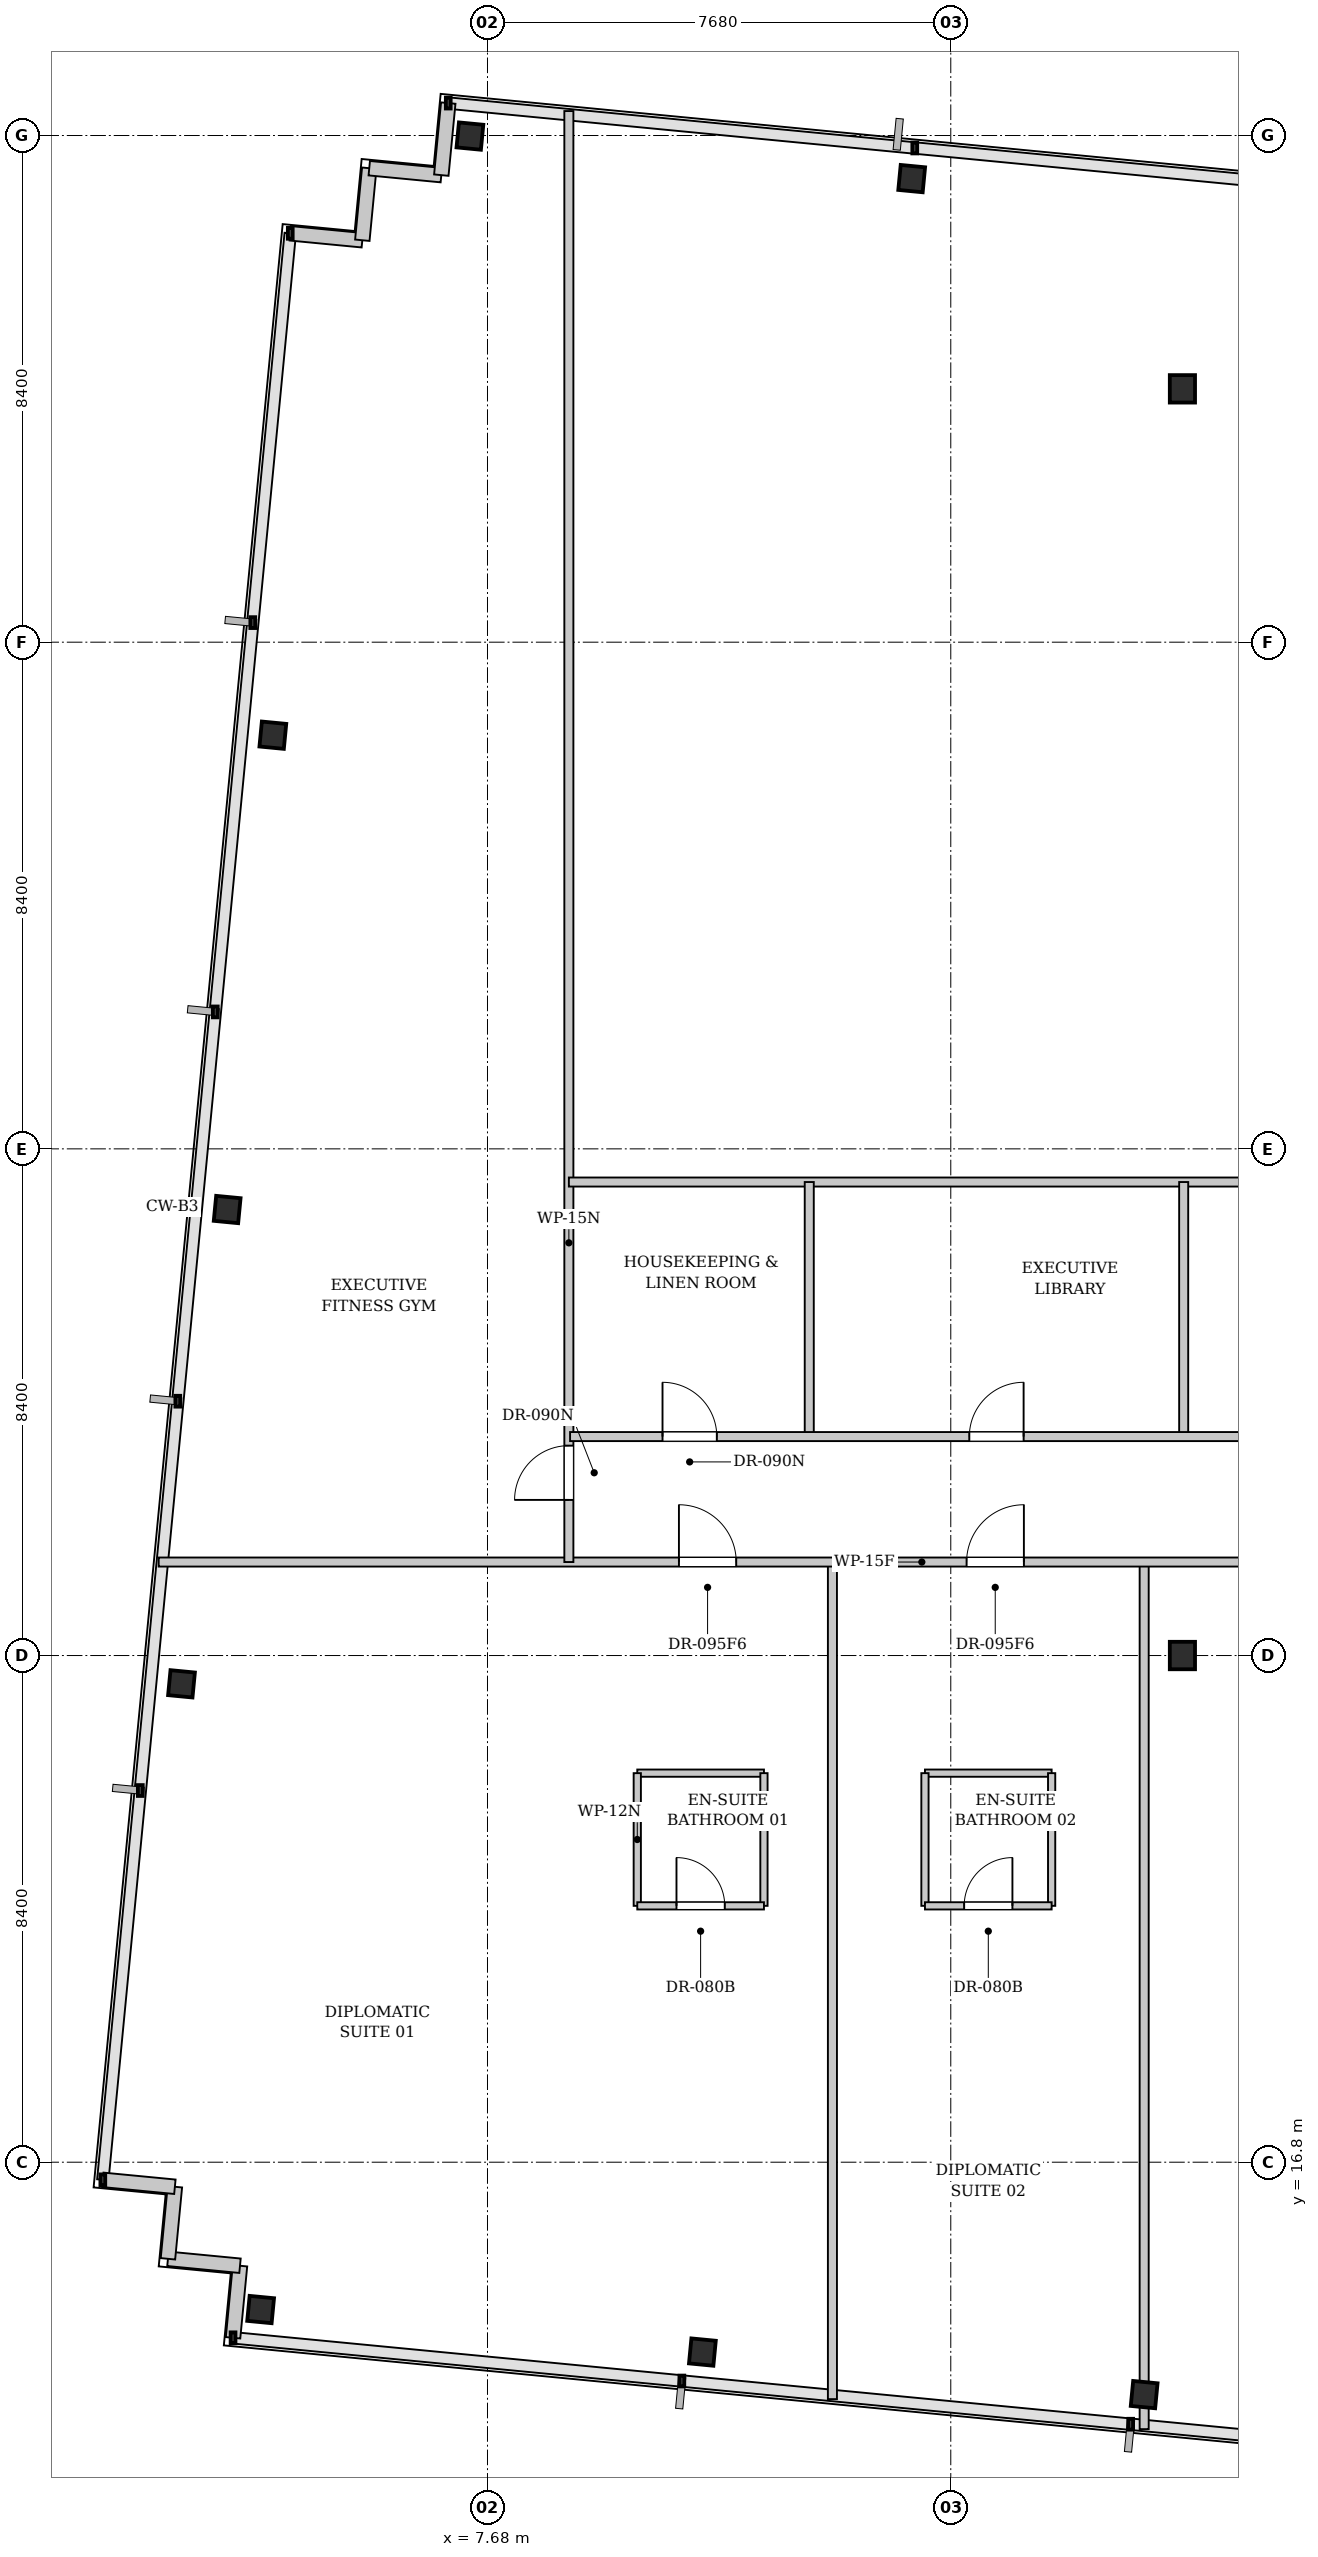
"""IFC4 building model, lengths in metres.
Left out: names, types, materials, properties, quantities, classifications, styles, units other than length and angle.
Written with IfcOpenShell. Run it as: python <this file> out.ifc"""

import sys

from ifc_helpers import new_model, si_unit, direction, frame, frame_2d, origin, origin_2d, place, context, subcontext, project, spatial, rectangle, i_section, extrude, element, fill, save


model = new_model("IFC4")
c1 = context("Model", 3, precision=1e-05, world=origin(), true_north=direction((0.0, 1.0)))
c2 = subcontext(c1, "Body", "Model", "MODEL_VIEW")
j1 = project(units=[si_unit("LENGTHUNIT", "METRE"), si_unit("PLANEANGLEUNIT", "RADIAN")], contexts=[c1])
p1 = place(None, origin())
s1 = spatial("IfcSite", under=j1, at=p1, CompositionType="ELEMENT")
p2 = place(p1, origin())
s2 = spatial("IfcBuilding", under=s1, at=p2, CompositionType="ELEMENT")
p3 = place(p2, frame((0.0, 0.0, 172.1)))
s3 = spatial("IfcBuildingStorey", under=s2, at=p3, CompositionType="ELEMENT", Elevation=172.1)
for number, where, z_axis, x_axis in (
    (1, (19.2, 25.2, 0.0), (0.0, 0.0, 1.0), (1.0, 0.0, 0.0)),
    (2, (19.2, 46.2, 0.0), (0.0, 0.0, 1.0), (1.0, 0.0, 0.0)),
):
    element("IfcColumn", number, at=place(p3, frame(where, z_axis=z_axis, x_axis=x_axis)), inside=s3, PredefinedType="COLUMN", context=c2, shape_type="SweptSolid", body=[
        extrude(i_section(OverallWidth=0.418, OverallDepth=0.455, WebThickness=0.042, FlangeThickness=0.068, FilletRadius=0.015, at=origin_2d()), origin(), (0.0, 0.0, 1.0), 3.3),
    ])
for number, where, z_axis, x_axis in (
    (3, (3.919, 14.357, 0.0), (0.0, 0.0, 1.0), (0.995, -0.096, 0.0)),
    (4, (11.242, 13.652, 0.0), (0.0, 0.0, 1.0), (0.995, -0.096, 0.0)),
    (5, (18.566, 12.947, 0.0), (0.0, 0.0, 1.0), (0.995, -0.096, 0.0)),
    (6, (7.389, 50.391, 0.0), (0.0, 0.0, 1.0), (0.995, -0.096, 0.0)),
    (7, (14.712, 49.686, 0.0), (0.0, 0.0, 1.0), (0.995, -0.096, 0.0)),
    (8, (2.607, 24.731, 0.0), (0.0, 0.0, 1.0), (0.995, -0.096, 0.0)),
    (9, (3.365, 32.594, 0.0), (0.0, 0.0, 1.0), (0.995, -0.096, 0.0)),
    (10, (4.122, 40.458, 0.0), (0.0, 0.0, 1.0), (0.995, -0.096, 0.0)),
):
    element("IfcColumn", number, at=place(p3, frame(where, z_axis=z_axis, x_axis=x_axis)), inside=s3, PredefinedType="COLUMN", context=c2, shape_type="SweptSolid", body=[
        extrude(i_section(OverallWidth=0.406, OverallDepth=0.416, WebThickness=0.03, FlangeThickness=0.048, FilletRadius=0.015, at=origin_2d()), origin(), (0.0, 0.0, 1.0), 3.3),
    ])
for number, where, z_axis, x_axis in (
    (11, (3.462, 13.889, 0.0), (0.0, 0.0, 1.0), (0.096, 0.995, 0.0)),
    (12, (3.577, 15.083, 0.0), (0.0, 0.0, 1.0), (-0.995, 0.096, 0.0)),
):
    element("IfcWall", number, at=place(p3, frame(where, z_axis=z_axis, x_axis=x_axis)), inside=s3, PredefinedType="SOLIDWALL", context=c2, shape_type="SweptSolid", body=[
        extrude(rectangle(XDim=1.2, YDim=0.24, at=frame_2d((0.6, 0.0))), origin(), (0.0, 0.0, 1.0), 3.08),
    ])
p4 = place(p3, frame((2.383, 15.198, 0.0), z_axis=(0.0, 0.0, 1.0), x_axis=(0.095836473879, 0.995397091755, 0.0)))
e13 = element("IfcWall", 13, at=p4, inside=s3, PredefinedType="SOLIDWALL", context=c2, shape_type="SweptSolid", body=[
    extrude(rectangle(XDim=1.2, YDim=0.24, at=frame_2d((0.6, 0.0))), origin(), (0.0, 0.0, 1.0), 3.08),
])
p5 = place(p3, frame((2.498, 16.393, 0.0), z_axis=(0.0, 0.0, 1.0), x_axis=(-0.995398960025, 0.095817067274, 0.0)))
e14 = element("IfcWall", 14, at=p5, inside=s3, PredefinedType="SOLIDWALL", context=c2, shape_type="SweptSolid", body=[
    extrude(rectangle(XDim=1.2, YDim=0.24, at=frame_2d((0.6, 0.0))), origin(), (0.0, 0.0, 1.0), 3.08),
])
p6 = place(p3, frame((4.411, 48.779, 0.0), z_axis=(0.0, 0.0, 1.0), x_axis=(0.995397091755, -0.095836473879, 0.0)))
e15 = element("IfcWall", 15, at=p6, inside=s3, PredefinedType="SOLIDWALL", context=c2, shape_type="SweptSolid", body=[
    extrude(rectangle(XDim=1.2, YDim=0.24, at=frame_2d((0.6, 0.0))), origin(), (0.0, 0.0, 1.0), 3.08),
])
p7 = place(p3, frame((5.605, 48.664, 0.0), z_axis=(0.0, 0.0, 1.0), x_axis=(0.096018626938, 0.995379537303, 0.0)))
e16 = element("IfcWall", 16, at=p7, inside=s3, PredefinedType="SOLIDWALL", context=c2, shape_type="SweptSolid", body=[
    extrude(rectangle(XDim=1.2, YDim=0.24, at=frame_2d((0.6, 0.0))), origin(), (0.0, 0.0, 1.0), 3.08),
])
for number, where, z_axis, x_axis in (
    (17, (5.72, 49.858, 0.0), (0.0, 0.0, 1.0), (0.995, -0.096, 0.0)),
    (18, (6.915, 49.743, 0.0), (0.0, 0.0, 1.0), (0.096, 0.995, 0.0)),
):
    element("IfcWall", number, at=place(p3, frame(where, z_axis=z_axis, x_axis=x_axis)), inside=s3, PredefinedType="SOLIDWALL", context=c2, shape_type="SweptSolid", body=[
        extrude(rectangle(XDim=1.2, YDim=0.24, at=frame_2d((0.6, 0.0))), origin(), (0.0, 0.0, 1.0), 3.08),
    ])
p8 = place(p3, frame((10.163, 23.25, 0.0), z_axis=(0.0, 0.0, 1.0), x_axis=(1.0, 0.0, 0.0)))
e19 = element("IfcWall", 19, at=p8, inside=s3, PredefinedType="PARTITIONING", context=c2, shape_type="SweptSolid", body=[
    extrude(rectangle(XDim=2.1, YDim=0.12, at=frame_2d((1.05, 0.0))), origin(), (0.0, 0.0, 1.0), 3.08),
])
for number, where, z_axis, x_axis in (
    (20, (10.163, 21.05, 0.0), (0.0, 0.0, 1.0), (0.0, 1.0, 0.0)),
    (21, (12.263, 21.05, 0.0), (0.0, 0.0, 1.0), (0.0, 1.0, 0.0)),
):
    element("IfcWall", number, at=place(p3, frame(where, z_axis=z_axis, x_axis=x_axis)), inside=s3, PredefinedType="PARTITIONING", context=c2, shape_type="SweptSolid", body=[
        extrude(rectangle(XDim=2.2, YDim=0.12, at=frame_2d((1.1, 0.0))), origin(), (0.0, 0.0, 1.0), 3.08),
    ])
p9 = place(p3, frame((10.163, 21.05, 0.0), z_axis=(0.0, 0.0, 1.0), x_axis=(1.0, 0.0, 0.0)))
e22 = element("IfcWall", 22, at=p9, inside=s3, PredefinedType="PARTITIONING", context=c2, shape_type="SweptSolid", body=[
    extrude(rectangle(XDim=2.1, YDim=0.12, at=frame_2d((1.05, 0.0))), origin(), (0.0, 0.0, 1.0), 3.08),
])
p10 = place(p9, frame((0.65, 0.0, 0.0)))
e23 = element("IfcOpeningElement", 23, at=p10, cuts=e22, PredefinedType="OPENING", context=c2, shape_type="SweptSolid", body=[
    extrude(rectangle(XDim=0.8, YDim=2.1, at=frame_2d((0.4, 1.05))), frame((0.0, 0.07, 0.0), z_axis=(0.0, -1.0, 0.0), x_axis=(1.0, 0.0, 0.0)), (0.0, 0.0, 1.0), 0.14),
])
p11 = place(p3, frame((14.932, 23.25, 0.0), z_axis=(0.0, 0.0, 1.0), x_axis=(1.0, 0.0, 0.0)))
e24 = element("IfcWall", 24, at=p11, inside=s3, PredefinedType="PARTITIONING", context=c2, shape_type="SweptSolid", body=[
    extrude(rectangle(XDim=2.1, YDim=0.12, at=frame_2d((1.05, 0.0))), origin(), (0.0, 0.0, 1.0), 3.08),
])
for number, where, z_axis, x_axis in (
    (25, (14.932, 21.05, 0.0), (0.0, 0.0, 1.0), (0.0, 1.0, 0.0)),
    (26, (17.032, 21.05, 0.0), (0.0, 0.0, 1.0), (0.0, 1.0, 0.0)),
):
    element("IfcWall", number, at=place(p3, frame(where, z_axis=z_axis, x_axis=x_axis)), inside=s3, PredefinedType="PARTITIONING", context=c2, shape_type="SweptSolid", body=[
        extrude(rectangle(XDim=2.2, YDim=0.12, at=frame_2d((1.1, 0.0))), origin(), (0.0, 0.0, 1.0), 3.08),
    ])
p12 = place(p3, frame((14.932, 21.05, 0.0), z_axis=(0.0, 0.0, 1.0), x_axis=(1.0, 0.0, 0.0)))
e27 = element("IfcWall", 27, at=p12, inside=s3, PredefinedType="PARTITIONING", context=c2, shape_type="SweptSolid", body=[
    extrude(rectangle(XDim=2.1, YDim=0.12, at=frame_2d((1.05, 0.0))), origin(), (0.0, 0.0, 1.0), 3.08),
])
p13 = place(p12, frame((0.65, 0.0, 0.0)))
e28 = element("IfcOpeningElement", 28, at=p13, cuts=e27, PredefinedType="OPENING", context=c2, shape_type="SweptSolid", body=[
    extrude(rectangle(XDim=0.8, YDim=2.1, at=frame_2d((0.4, 1.05))), frame((0.0, 0.07, 0.0), z_axis=(0.0, -1.0, 0.0), x_axis=(1.0, 0.0, 0.0)), (0.0, 0.0, 1.0), 0.14),
])
p14 = place(p3, frame((13.398, 12.872, 0.0), z_axis=(0.0, 0.0, 1.0), x_axis=(0.0, 1.0, 0.0)))
e29 = element("IfcWall", 29, at=p14, inside=s3, PredefinedType="PARTITIONING", context=c2, shape_type="SweptSolid", body=[
    extrude(rectangle(XDim=13.898, YDim=0.15, at=frame_2d((6.949, 0.0))), origin(), (0.0, 0.0, 1.0), 3.08),
])
p15 = place(p3, frame((18.566, 12.374, 0.0), z_axis=(0.0, 0.0, 1.0), x_axis=(0.0, 1.0, 0.0)))
e30 = element("IfcWall", 30, at=p15, inside=s3, PredefinedType="PARTITIONING", context=c2, shape_type="SweptSolid", body=[
    extrude(rectangle(XDim=14.396, YDim=0.15, at=frame_2d((7.198, 0.0))), origin(), (0.0, 0.0, 1.0), 2.475),
])
p16 = place(p3, frame((2.229, 26.75, 0.0), z_axis=(0.0, 0.0, 1.0), x_axis=(1.0, 0.0, 0.0)))
e31 = element("IfcWall", 31, at=p16, inside=s3, PredefinedType="PARTITIONING", context=c2, shape_type="SweptSolid", body=[
    extrude(rectangle(XDim=57.505, YDim=0.15, at=frame_2d((28.752, 0.0))), origin(), (0.0, 0.0, 1.0), 2.475),
])
p17 = place(p16, frame((8.624, 0.0, 0.0)))
e32 = element("IfcOpeningElement", 32, at=p17, cuts=e31, PredefinedType="OPENING", context=c2, shape_type="SweptSolid", body=[
    extrude(rectangle(XDim=0.95, YDim=2.15, at=frame_2d((0.475, 1.075))), frame((0.0, 0.085, 0.0), z_axis=(0.0, -1.0, 0.0), x_axis=(1.0, 0.0, 0.0)), (0.0, 0.0, 1.0), 0.17),
])
p18 = place(p16, frame((13.393, 0.0, 0.0)))
e33 = element("IfcOpeningElement", 33, at=p18, cuts=e31, PredefinedType="OPENING", context=c2, shape_type="SweptSolid", body=[
    extrude(rectangle(XDim=0.95, YDim=2.15, at=frame_2d((0.475, 1.075))), frame((0.0, 0.085, 0.0), z_axis=(0.0, -1.0, 0.0), x_axis=(1.0, 0.0, 0.0)), (0.0, 0.0, 1.0), 0.17),
])
p19 = place(p16, frame((18.412, 0.0, 0.0)))
e34 = element("IfcOpeningElement", 34, at=p19, cuts=e31, PredefinedType="OPENING", context=c2, shape_type="SweptSolid", body=[
    extrude(rectangle(XDim=0.95, YDim=2.15, at=frame_2d((0.475, 1.075))), frame((0.0, 0.085, 0.0), z_axis=(0.0, -1.0, 0.0), x_axis=(1.0, 0.0, 0.0)), (0.0, 0.0, 1.0), 0.17),
])
p20 = place(p16, frame((25.935, 0.0, 0.0)))
e35 = element("IfcOpeningElement", 35, at=p20, cuts=e31, PredefinedType="OPENING", context=c2, shape_type="SweptSolid", body=[
    extrude(rectangle(XDim=0.95, YDim=2.15, at=frame_2d((0.475, 1.075))), frame((0.0, 0.085, 0.0), z_axis=(0.0, -1.0, 0.0), x_axis=(1.0, 0.0, 0.0)), (0.0, 0.0, 1.0), 0.17),
])
p21 = place(p16, frame((33.733, 0.0, 0.0)))
e36 = element("IfcOpeningElement", 36, at=p21, cuts=e31, PredefinedType="OPENING", context=c2, shape_type="SweptSolid", body=[
    extrude(rectangle(XDim=0.95, YDim=2.15, at=frame_2d((0.475, 1.075))), frame((0.0, 0.085, 0.0), z_axis=(0.0, -1.0, 0.0), x_axis=(1.0, 0.0, 0.0)), (0.0, 0.0, 1.0), 0.17),
])
p22 = place(p16, frame((40.441, 0.0, 0.0)))
e37 = element("IfcOpeningElement", 37, at=p22, cuts=e31, PredefinedType="OPENING", context=c2, shape_type="SweptSolid", body=[
    extrude(rectangle(XDim=0.95, YDim=2.15, at=frame_2d((0.475, 1.075))), frame((0.0, 0.085, 0.0), z_axis=(0.0, -1.0, 0.0), x_axis=(1.0, 0.0, 0.0)), (0.0, 0.0, 1.0), 0.17),
])
p23 = place(p16, frame((45.822, 0.0, 0.0)))
e38 = element("IfcOpeningElement", 38, at=p23, cuts=e31, PredefinedType="OPENING", context=c2, shape_type="SweptSolid", body=[
    extrude(rectangle(XDim=0.95, YDim=2.15, at=frame_2d((0.475, 1.075))), frame((0.0, 0.085, 0.0), z_axis=(0.0, -1.0, 0.0), x_axis=(1.0, 0.0, 0.0)), (0.0, 0.0, 1.0), 0.17),
])
p24 = place(p16, frame((49.073, 0.0, 0.0)))
e39 = element("IfcOpeningElement", 39, at=p24, cuts=e31, PredefinedType="OPENING", context=c2, shape_type="SweptSolid", body=[
    extrude(rectangle(XDim=0.95, YDim=2.15, at=frame_2d((0.475, 1.075))), frame((0.0, 0.085, 0.0), z_axis=(0.0, -1.0, 0.0), x_axis=(1.0, 0.0, 0.0)), (0.0, 0.0, 1.0), 0.17),
])
p25 = place(p3, frame((9.029, 26.75, 0.0), z_axis=(0.0, 0.0, 1.0), x_axis=(0.0, 1.0, 0.0)))
e40 = element("IfcWall", 40, at=p25, inside=s3, PredefinedType="PARTITIONING", context=c2, shape_type="SweptSolid", body=[
    extrude(rectangle(XDim=24.055, YDim=0.15, at=frame_2d((12.028, 0.0))), origin(), (0.0, 0.0, 1.0), 3.08),
])
p26 = place(p25, frame((1.03, 0.0, 0.0)))
e41 = element("IfcOpeningElement", 41, at=p26, cuts=e40, PredefinedType="OPENING", context=c2, shape_type="SweptSolid", body=[
    extrude(rectangle(XDim=0.9, YDim=2.15, at=frame_2d((0.45, 1.075))), frame((0.0, 0.085, 0.0), z_axis=(0.0, -1.0, 0.0), x_axis=(1.0, 0.0, 0.0)), (0.0, 0.0, 1.0), 0.17),
])
p27 = place(p3, frame((9.029, 33.05, 0.0), z_axis=(0.0, 0.0, 1.0), x_axis=(1.0, 0.0, 0.0)))
e42 = element("IfcWall", 42, at=p27, inside=s3, PredefinedType="PARTITIONING", context=c2, shape_type="SweptSolid", body=[
    extrude(rectangle(XDim=17.271, YDim=0.15, at=frame_2d((8.635, 0.0))), origin(), (0.0, 0.0, 1.0), 2.475),
])
p28 = place(p3, frame((13.014, 28.83, 0.0), z_axis=(0.0, 0.0, 1.0), x_axis=(0.0, 1.0, 0.0)))
e43 = element("IfcWall", 43, at=p28, inside=s3, PredefinedType="PARTITIONING", context=c2, shape_type="SweptSolid", body=[
    extrude(rectangle(XDim=4.22, YDim=0.15, at=frame_2d((2.11, 0.0))), origin(), (0.0, 0.0, 1.0), 3.08),
])
p29 = place(p3, frame((19.221, 28.83, 0.0), z_axis=(0.0, 0.0, 1.0), x_axis=(0.0, 1.0, 0.0)))
e44 = element("IfcWall", 44, at=p29, inside=s3, PredefinedType="PARTITIONING", context=c2, shape_type="SweptSolid", body=[
    extrude(rectangle(XDim=4.22, YDim=0.15, at=frame_2d((2.11, 0.0))), origin(), (0.0, 0.0, 1.0), 2.475),
])
p30 = place(p3, frame((9.049, 28.83, 0.0), z_axis=(0.0, 0.0, 1.0), x_axis=(1.0, 0.0, 0.0)))
e45 = element("IfcWall", 45, at=p30, inside=s3, PredefinedType="PARTITIONING", context=c2, shape_type="SweptSolid", body=[
    extrude(rectangle(XDim=17.241, YDim=0.15, at=frame_2d((8.621, 0.0))), origin(), (0.0, 0.0, 1.0), 2.475),
])
p31 = place(p30, frame((1.532, 0.0, 0.0)))
e46 = element("IfcOpeningElement", 46, at=p31, cuts=e45, PredefinedType="OPENING", context=c2, shape_type="SweptSolid", body=[
    extrude(rectangle(XDim=0.9, YDim=2.15, at=frame_2d((0.45, 1.075))), frame((0.0, 0.085, 0.0), z_axis=(0.0, -1.0, 0.0), x_axis=(1.0, 0.0, 0.0)), (0.0, 0.0, 1.0), 0.17),
])
p32 = place(p30, frame((6.618, 0.0, 0.0)))
e47 = element("IfcOpeningElement", 47, at=p32, cuts=e45, PredefinedType="OPENING", context=c2, shape_type="SweptSolid", body=[
    extrude(rectangle(XDim=0.9, YDim=2.15, at=frame_2d((0.45, 1.075))), frame((0.0, 0.085, 0.0), z_axis=(0.0, -1.0, 0.0), x_axis=(1.0, 0.0, 0.0)), (0.0, 0.0, 1.0), 0.17),
])
p33 = place(p30, frame((13.257, 0.0, 0.0)))
e48 = element("IfcOpeningElement", 48, at=p33, cuts=e45, PredefinedType="OPENING", context=c2, shape_type="SweptSolid", body=[
    extrude(rectangle(XDim=0.9, YDim=2.15, at=frame_2d((0.45, 1.075))), frame((0.0, 0.085, 0.0), z_axis=(0.0, -1.0, 0.0), x_axis=(1.0, 0.0, 0.0)), (0.0, 0.0, 1.0), 0.17),
])
p34 = place(p10, origin())
e49 = element("IfcDoor", 49, at=p34, inside=s3, OperationType="SINGLE_SWING_LEFT", PredefinedType="DOOR", context=c2, shape_type="SweptSolid", body=[
    extrude(rectangle(XDim=0.8, YDim=2.1, at=frame_2d((0.4, 1.05))), frame((0.0, 0.025, 0.0), z_axis=(0.0, -1.0, 0.0), x_axis=(1.0, 0.0, 0.0)), (0.0, 0.0, 1.0), 0.05),
])
fill(e23, e49)
p35 = place(p13, origin())
e50 = element("IfcDoor", 50, at=p35, inside=s3, OperationType="SINGLE_SWING_RIGHT", PredefinedType="DOOR", context=c2, shape_type="SweptSolid", body=[
    extrude(rectangle(XDim=0.8, YDim=2.1, at=frame_2d((0.4, 1.05))), frame((0.0, 0.025, 0.0), z_axis=(0.0, -1.0, 0.0), x_axis=(1.0, 0.0, 0.0)), (0.0, 0.0, 1.0), 0.05),
])
fill(e28, e50)
p36 = place(p17, origin())
e51 = element("IfcDoor", 51, at=p36, inside=s3, OperationType="SINGLE_SWING_LEFT", PredefinedType="DOOR", context=c2, shape_type="SweptSolid", body=[
    extrude(rectangle(XDim=0.95, YDim=2.15, at=frame_2d((0.475, 1.075))), frame((0.0, 0.025, 0.0), z_axis=(0.0, -1.0, 0.0), x_axis=(1.0, 0.0, 0.0)), (0.0, 0.0, 1.0), 0.05),
])
fill(e32, e51)
p37 = place(p18, origin())
e52 = element("IfcDoor", 52, at=p37, inside=s3, OperationType="SINGLE_SWING_RIGHT", PredefinedType="DOOR", context=c2, shape_type="SweptSolid", body=[
    extrude(rectangle(XDim=0.95, YDim=2.15, at=frame_2d((0.475, 1.075))), frame((0.0, 0.025, 0.0), z_axis=(0.0, -1.0, 0.0), x_axis=(1.0, 0.0, 0.0)), (0.0, 0.0, 1.0), 0.05),
])
fill(e33, e52)
p38 = place(p26, origin())
e53 = element("IfcDoor", 53, at=p38, inside=s3, OperationType="SINGLE_SWING_LEFT", PredefinedType="DOOR", context=c2, shape_type="SweptSolid", body=[
    extrude(rectangle(XDim=0.9, YDim=2.15, at=frame_2d((0.45, 1.075))), frame((0.0, 0.025, 0.0), z_axis=(0.0, -1.0, 0.0), x_axis=(1.0, 0.0, 0.0)), (0.0, 0.0, 1.0), 0.05),
])
fill(e41, e53)
p39 = place(p31, origin())
e54 = element("IfcDoor", 54, at=p39, inside=s3, OperationType="SINGLE_SWING_LEFT", PredefinedType="DOOR", context=c2, shape_type="SweptSolid", body=[
    extrude(rectangle(XDim=0.9, YDim=2.15, at=frame_2d((0.45, 1.075))), frame((0.0, 0.025, 0.0), z_axis=(0.0, -1.0, 0.0), x_axis=(1.0, 0.0, 0.0)), (0.0, 0.0, 1.0), 0.05),
])
fill(e46, e54)
p40 = place(p32, origin())
e55 = element("IfcDoor", 55, at=p40, inside=s3, OperationType="SINGLE_SWING_RIGHT", PredefinedType="DOOR", context=c2, shape_type="SweptSolid", body=[
    extrude(rectangle(XDim=0.9, YDim=2.15, at=frame_2d((0.45, 1.075))), frame((0.0, 0.025, 0.0), z_axis=(0.0, -1.0, 0.0), x_axis=(1.0, 0.0, 0.0)), (0.0, 0.0, 1.0), 0.05),
])
fill(e47, e55)
save(model, sys.argv[1])
